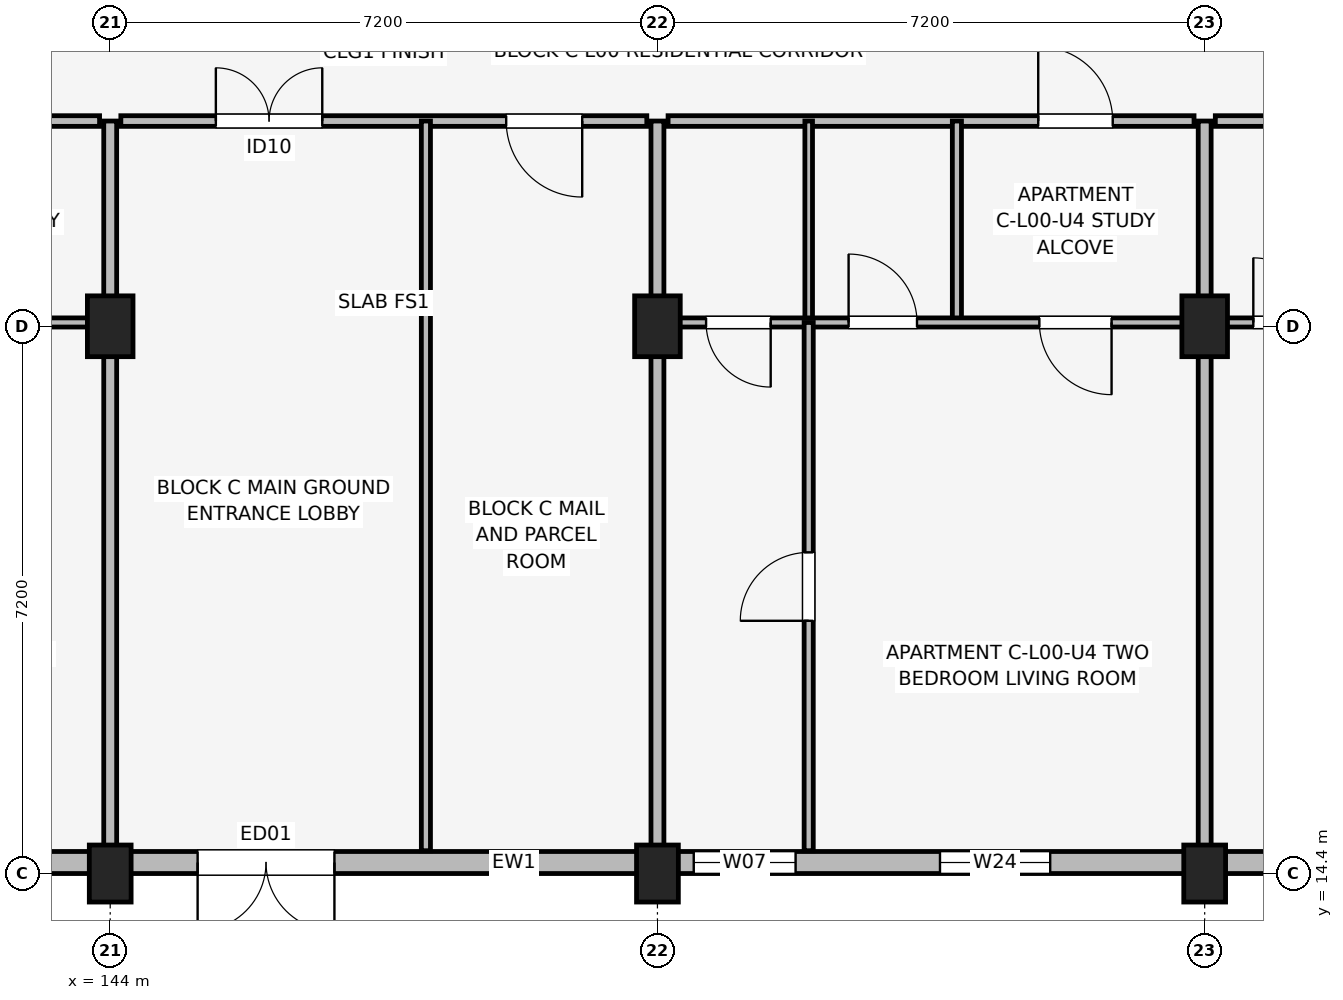
"""IFC4 building model, lengths in metres.
Left out: names, types, materials, properties, quantities, classifications, styles, units other than length and angle.
Written with IfcOpenShell. Run it as: python <this file> out.ifc"""

import sys

from ifc_helpers import new_model, si_unit, direction, frame, frame_2d, origin, origin_2d, place, context, subcontext, project, spatial, rectangle, extrude, element, fill, save


model = new_model("IFC4")
c1 = context("Model", 3, precision=1e-05, world=origin(), true_north=direction((0.0, 1.0)))
c2 = subcontext(c1, "Body", "Model", "MODEL_VIEW")
j1 = project(units=[si_unit("LENGTHUNIT", "METRE"), si_unit("PLANEANGLEUNIT", "RADIAN")], contexts=[c1])
p1 = place(None, origin())
s1 = spatial("IfcSite", under=j1, at=p1, CompositionType="ELEMENT")
p2 = place(p1, origin())
s2 = spatial("IfcBuilding", under=s1, at=p2, CompositionType="ELEMENT")
p3 = place(p2, origin())
s3 = spatial("IfcBuildingStorey", under=s2, at=p3, CompositionType="ELEMENT", Elevation=0.0)
p4 = place(p3, frame((144.0, 14.4, 0.0), z_axis=(0.0, 0.0, 1.0), x_axis=(1.0, 0.0, 0.0)))
e1 = element("IfcColumn", 1, at=p4, inside=s3, PredefinedType="COLUMN", context=c2, shape_type="SweptSolid", body=[
    extrude(rectangle(XDim=0.55, YDim=0.75, at=origin_2d()), origin(), (0.0, 0.0, 1.0), 4.5),
])
p5 = place(p3, frame((144.0, 21.6, 0.0), z_axis=(0.0, 0.0, 1.0), x_axis=(1.0, 0.0, 0.0)))
e2 = element("IfcColumn", 2, at=p5, inside=s3, PredefinedType="COLUMN", context=c2, shape_type="SweptSolid", body=[
    extrude(rectangle(XDim=0.6, YDim=0.8, at=origin_2d()), origin(), (0.0, 0.0, 1.0), 4.5),
])
p6 = place(p3, frame((151.2, 14.4, 0.0), z_axis=(0.0, 0.0, 1.0), x_axis=(1.0, 0.0, 0.0)))
e3 = element("IfcColumn", 3, at=p6, inside=s3, PredefinedType="COLUMN", context=c2, shape_type="SweptSolid", body=[
    extrude(rectangle(XDim=0.55, YDim=0.75, at=origin_2d()), origin(), (0.0, 0.0, 1.0), 4.5),
])
p7 = place(p3, frame((151.2, 21.6, 0.0), z_axis=(0.0, 0.0, 1.0), x_axis=(1.0, 0.0, 0.0)))
e4 = element("IfcColumn", 4, at=p7, inside=s3, PredefinedType="COLUMN", context=c2, shape_type="SweptSolid", body=[
    extrude(rectangle(XDim=0.6, YDim=0.8, at=origin_2d()), origin(), (0.0, 0.0, 1.0), 4.5),
])
p8 = place(p3, frame((158.4, 14.4, 0.0), z_axis=(0.0, 0.0, 1.0), x_axis=(1.0, 0.0, 0.0)))
e5 = element("IfcColumn", 5, at=p8, inside=s3, PredefinedType="COLUMN", context=c2, shape_type="SweptSolid", body=[
    extrude(rectangle(XDim=0.55, YDim=0.75, at=origin_2d()), origin(), (0.0, 0.0, 1.0), 4.5),
])
p9 = place(p3, frame((158.4, 21.6, 0.0), z_axis=(0.0, 0.0, 1.0), x_axis=(1.0, 0.0, 0.0)))
e6 = element("IfcColumn", 6, at=p9, inside=s3, PredefinedType="COLUMN", context=c2, shape_type="SweptSolid", body=[
    extrude(rectangle(XDim=0.6, YDim=0.8, at=origin_2d()), origin(), (0.0, 0.0, 1.0), 4.5),
])
p10 = place(p3, frame((132.6, 14.545, 0.0), z_axis=(0.0, 0.0, 1.0), x_axis=(1.0, 0.0, 0.0)))
e7 = element("IfcWall", 7, at=p10, inside=s3, PredefinedType="SOLIDWALL", context=c2, shape_type="SweptSolid", body=[
    extrude(rectangle(XDim=30.0, YDim=0.29, at=frame_2d((15.0, 0.0))), origin(), (0.0, 0.0, 1.0), 3.38),
])
p11 = place(p10, frame((14.35, 0.0, 0.0), z_axis=(0.0, 0.0, 1.0), x_axis=(-1.0, 0.0, 0.0)))
e8 = element("IfcOpeningElement", 8, at=p11, cuts=e7, PredefinedType="OPENING", context=c2, shape_type="SweptSolid", body=[
    extrude(rectangle(XDim=1.8, YDim=2.4, at=frame_2d((0.9, 1.2))), frame((0.0, 0.155, 0.0), z_axis=(0.0, -1.0, 0.0), x_axis=(1.0, 0.0, 0.0)), (0.0, 0.0, 1.0), 0.31),
])
p12 = place(p10, frame((2.663, 0.0, 0.75)))
e9 = element("IfcOpeningElement", 9, at=p12, cuts=e7, PredefinedType="OPENING", context=c2, shape_type="SweptSolid", body=[
    extrude(rectangle(XDim=0.98, YDim=1.45, at=frame_2d((0.49, 0.725))), frame((0.0, 0.155, 0.0), z_axis=(0.0, -1.0, 0.0), x_axis=(1.0, 0.0, 0.0)), (0.0, 0.0, 1.0), 0.31),
])
p13 = place(p10, frame((4.798, 0.0, 0.75)))
e10 = element("IfcOpeningElement", 10, at=p13, cuts=e7, PredefinedType="OPENING", context=c2, shape_type="SweptSolid", body=[
    extrude(rectangle(XDim=1.1, YDim=1.5, at=frame_2d((0.55, 0.75))), frame((0.0, 0.155, 0.0), z_axis=(0.0, -1.0, 0.0), x_axis=(1.0, 0.0, 0.0)), (0.0, 0.0, 1.0), 0.31),
])
p14 = place(p10, frame((7.492, 0.0, 0.7)))
e11 = element("IfcOpeningElement", 11, at=p14, cuts=e7, PredefinedType="OPENING", context=c2, shape_type="SweptSolid", body=[
    extrude(rectangle(XDim=2.3, YDim=1.65, at=frame_2d((1.15, 0.825))), frame((0.0, 0.155, 0.0), z_axis=(0.0, -1.0, 0.0), x_axis=(1.0, 0.0, 0.0)), (0.0, 0.0, 1.0), 0.31),
])
p15 = place(p10, frame((19.077, 0.0, 0.75)))
e12 = element("IfcOpeningElement", 12, at=p15, cuts=e7, PredefinedType="OPENING", context=c2, shape_type="SweptSolid", body=[
    extrude(rectangle(XDim=1.34, YDim=1.55, at=frame_2d((0.67, 0.775))), frame((0.0, 0.155, 0.0), z_axis=(0.0, -1.0, 0.0), x_axis=(1.0, 0.0, 0.0)), (0.0, 0.0, 1.0), 0.31),
])
p16 = place(p10, frame((22.317, 0.0, 0.7)))
e13 = element("IfcOpeningElement", 13, at=p16, cuts=e7, PredefinedType="OPENING", context=c2, shape_type="SweptSolid", body=[
    extrude(rectangle(XDim=1.45, YDim=2.1, at=frame_2d((0.725, 1.05))), frame((0.0, 0.155, 0.0), z_axis=(0.0, -1.0, 0.0), x_axis=(1.0, 0.0, 0.0)), (0.0, 0.0, 1.0), 0.31),
])
p17 = place(p10, frame((26.647, 0.0, 0.75)))
e14 = element("IfcOpeningElement", 14, at=p17, cuts=e7, PredefinedType="OPENING", context=c2, shape_type="SweptSolid", body=[
    extrude(rectangle(XDim=0.6, YDim=1.25, at=frame_2d((0.3, 0.625))), frame((0.0, 0.155, 0.0), z_axis=(0.0, -1.0, 0.0), x_axis=(1.0, 0.0, 0.0)), (0.0, 0.0, 1.0), 0.31),
])
p18 = place(p10, frame((28.455, 0.0, 0.75)))
e15 = element("IfcOpeningElement", 15, at=p18, cuts=e7, PredefinedType="OPENING", context=c2, shape_type="SweptSolid", body=[
    extrude(rectangle(XDim=0.72, YDim=1.35, at=frame_2d((0.36, 0.675))), frame((0.0, 0.155, 0.0), z_axis=(0.0, -1.0, 0.0), x_axis=(1.0, 0.0, 0.0)), (0.0, 0.0, 1.0), 0.31),
])
p19 = place(p3, frame((136.94, 24.3, 0.0), z_axis=(0.0, 0.0, 1.0), x_axis=(1.0, 0.0, 0.0)))
e16 = element("IfcWall", 16, at=p19, inside=s3, PredefinedType="PARTITIONING", context=c2, shape_type="SweptSolid", body=[
    extrude(rectangle(XDim=6.92, YDim=0.14, at=frame_2d((3.46, 0.0))), origin(), (0.0, 0.0, 1.0), 3.15),
])
p20 = place(p19, frame((4.87, 0.0, 0.0)))
e17 = element("IfcOpeningElement", 17, at=p20, cuts=e16, PredefinedType="OPENING", context=c2, shape_type="SweptSolid", body=[
    extrude(rectangle(XDim=0.98, YDim=2.1, at=frame_2d((0.49, 1.05))), frame((0.0, 0.08, 0.0), z_axis=(0.0, -1.0, 0.0), x_axis=(1.0, 0.0, 0.0)), (0.0, 0.0, 1.0), 0.16),
])
p21 = place(p3, frame((136.94, 21.65, 0.0), z_axis=(0.0, 0.0, 1.0), x_axis=(1.0, 0.0, 0.0)))
e18 = element("IfcWall", 18, at=p21, inside=s3, PredefinedType="PARTITIONING", context=c2, shape_type="SweptSolid", body=[
    extrude(rectangle(XDim=6.92, YDim=0.12, at=frame_2d((3.46, 0.0))), origin(), (0.0, 0.0, 1.0), 3.15),
])
p22 = place(p21, frame((1.35, 0.0, 0.0), z_axis=(0.0, 0.0, 1.0), x_axis=(-1.0, 0.0, 0.0)))
e19 = element("IfcOpeningElement", 19, at=p22, cuts=e18, PredefinedType="OPENING", context=c2, shape_type="SweptSolid", body=[
    extrude(rectangle(XDim=0.85, YDim=2.08, at=frame_2d((0.425, 1.04))), frame((0.0, 0.07, 0.0), z_axis=(0.0, -1.0, 0.0), x_axis=(1.0, 0.0, 0.0)), (0.0, 0.0, 1.0), 0.14),
])
p23 = place(p21, frame((2.375, 0.0, 0.0)))
e20 = element("IfcOpeningElement", 20, at=p23, cuts=e18, PredefinedType="OPENING", context=c2, shape_type="SweptSolid", body=[
    extrude(rectangle(XDim=0.9, YDim=2.08, at=frame_2d((0.45, 1.04))), frame((0.0, 0.07, 0.0), z_axis=(0.0, -1.0, 0.0), x_axis=(1.0, 0.0, 0.0)), (0.0, 0.0, 1.0), 0.14),
])
p24 = place(p21, frame((5.835, 0.0, 0.0), z_axis=(0.0, 0.0, 1.0), x_axis=(-1.0, 0.0, 0.0)))
e21 = element("IfcOpeningElement", 21, at=p24, cuts=e18, PredefinedType="OPENING", context=c2, shape_type="SweptSolid", body=[
    extrude(rectangle(XDim=0.95, YDim=2.08, at=frame_2d((0.475, 1.04))), frame((0.0, 0.07, 0.0), z_axis=(0.0, -1.0, 0.0), x_axis=(1.0, 0.0, 0.0)), (0.0, 0.0, 1.0), 0.14),
])
p25 = place(p3, frame((144.0, 14.7, 0.0), z_axis=(0.0, 0.0, 1.0), x_axis=(0.0, 1.0, 0.0)))
e22 = element("IfcWall", 22, at=p25, inside=s3, PredefinedType="PARTITIONING", context=c2, shape_type="SweptSolid", body=[
    extrude(rectangle(XDim=9.6, YDim=0.17, at=frame_2d((4.8, 0.0))), origin(), (0.0, 0.0, 1.0), 3.15),
])
p26 = place(p3, frame((144.14, 24.3, 0.0), z_axis=(0.0, 0.0, 1.0), x_axis=(1.0, 0.0, 0.0)))
e23 = element("IfcWall", 23, at=p26, inside=s3, PredefinedType="PARTITIONING", context=c2, shape_type="SweptSolid", body=[
    extrude(rectangle(XDim=6.92, YDim=0.14, at=frame_2d((3.46, 0.0))), origin(), (0.0, 0.0, 1.0), 3.15),
])
p27 = place(p26, frame((1.25, 0.0, 0.0)))
e24 = element("IfcOpeningElement", 24, at=p27, cuts=e23, PredefinedType="OPENING", context=c2, shape_type="SweptSolid", body=[
    extrude(rectangle(XDim=1.4, YDim=2.22, at=frame_2d((0.7, 1.11))), frame((0.0, 0.08, 0.0), z_axis=(0.0, -1.0, 0.0), x_axis=(1.0, 0.0, 0.0)), (0.0, 0.0, 1.0), 0.16),
])
p28 = place(p26, frame((6.07, 0.0, 0.0), z_axis=(0.0, 0.0, 1.0), x_axis=(-1.0, 0.0, 0.0)))
e25 = element("IfcOpeningElement", 25, at=p28, cuts=e23, PredefinedType="OPENING", context=c2, shape_type="SweptSolid", body=[
    extrude(rectangle(XDim=1.0, YDim=2.12, at=frame_2d((0.5, 1.06))), frame((0.0, 0.08, 0.0), z_axis=(0.0, -1.0, 0.0), x_axis=(1.0, 0.0, 0.0)), (0.0, 0.0, 1.0), 0.16),
])
p29 = place(p3, frame((148.154, 14.7, 0.0), z_axis=(0.0, 0.0, 1.0), x_axis=(0.0, 1.0, 0.0)))
e26 = element("IfcWall", 26, at=p29, inside=s3, PredefinedType="PARTITIONING", context=c2, shape_type="SweptSolid", body=[
    extrude(rectangle(XDim=9.6, YDim=0.12, at=frame_2d((4.8, 0.0))), origin(), (0.0, 0.0, 1.0), 3.15),
])
p30 = place(p3, frame((151.2, 14.7, 0.0), z_axis=(0.0, 0.0, 1.0), x_axis=(0.0, 1.0, 0.0)))
e27 = element("IfcWall", 27, at=p30, inside=s3, PredefinedType="PARTITIONING", context=c2, shape_type="SweptSolid", body=[
    extrude(rectangle(XDim=9.6, YDim=0.17, at=frame_2d((4.8, 0.0))), origin(), (0.0, 0.0, 1.0), 3.15),
])
p31 = place(p3, frame((151.34, 24.3, 0.0), z_axis=(0.0, 0.0, 1.0), x_axis=(1.0, 0.0, 0.0)))
e28 = element("IfcWall", 28, at=p31, inside=s3, PredefinedType="PARTITIONING", context=c2, shape_type="SweptSolid", body=[
    extrude(rectangle(XDim=6.92, YDim=0.14, at=frame_2d((3.46, 0.0))), origin(), (0.0, 0.0, 1.0), 3.15),
])
p32 = place(p31, frame((4.87, 0.0, 0.0)))
e29 = element("IfcOpeningElement", 29, at=p32, cuts=e28, PredefinedType="OPENING", context=c2, shape_type="SweptSolid", body=[
    extrude(rectangle(XDim=0.98, YDim=2.1, at=frame_2d((0.49, 1.05))), frame((0.0, 0.08, 0.0), z_axis=(0.0, -1.0, 0.0), x_axis=(1.0, 0.0, 0.0)), (0.0, 0.0, 1.0), 0.16),
])
p33 = place(p3, frame((153.19, 21.65, 0.0), z_axis=(0.0, 0.0, 1.0), x_axis=(0.0, 1.0, 0.0)))
e30 = element("IfcWall", 30, at=p33, inside=s3, PredefinedType="PARTITIONING", context=c2, shape_type="SweptSolid", body=[
    extrude(rectangle(XDim=2.65, YDim=0.1, at=frame_2d((1.325, 0.0))), origin(), (0.0, 0.0, 1.0), 3.15),
])
p34 = place(p3, frame((155.14, 21.65, 0.0), z_axis=(0.0, 0.0, 1.0), x_axis=(0.0, 1.0, 0.0)))
e31 = element("IfcWall", 31, at=p34, inside=s3, PredefinedType="PARTITIONING", context=c2, shape_type="SweptSolid", body=[
    extrude(rectangle(XDim=2.65, YDim=0.12, at=frame_2d((1.325, 0.0))), origin(), (0.0, 0.0, 1.0), 3.15),
])
p35 = place(p3, frame((151.34, 21.65, 0.0), z_axis=(0.0, 0.0, 1.0), x_axis=(1.0, 0.0, 0.0)))
e32 = element("IfcWall", 32, at=p35, inside=s3, PredefinedType="PARTITIONING", context=c2, shape_type="SweptSolid", body=[
    extrude(rectangle(XDim=6.92, YDim=0.12, at=frame_2d((3.46, 0.0))), origin(), (0.0, 0.0, 1.0), 3.15),
])
p36 = place(p35, frame((1.35, 0.0, 0.0), z_axis=(0.0, 0.0, 1.0), x_axis=(-1.0, 0.0, 0.0)))
e33 = element("IfcOpeningElement", 33, at=p36, cuts=e32, PredefinedType="OPENING", context=c2, shape_type="SweptSolid", body=[
    extrude(rectangle(XDim=0.85, YDim=2.08, at=frame_2d((0.425, 1.04))), frame((0.0, 0.07, 0.0), z_axis=(0.0, -1.0, 0.0), x_axis=(1.0, 0.0, 0.0)), (0.0, 0.0, 1.0), 0.14),
])
p37 = place(p35, frame((2.375, 0.0, 0.0)))
e34 = element("IfcOpeningElement", 34, at=p37, cuts=e32, PredefinedType="OPENING", context=c2, shape_type="SweptSolid", body=[
    extrude(rectangle(XDim=0.9, YDim=2.08, at=frame_2d((0.45, 1.04))), frame((0.0, 0.07, 0.0), z_axis=(0.0, -1.0, 0.0), x_axis=(1.0, 0.0, 0.0)), (0.0, 0.0, 1.0), 0.14),
])
p38 = place(p35, frame((5.835, 0.0, 0.0), z_axis=(0.0, 0.0, 1.0), x_axis=(-1.0, 0.0, 0.0)))
e35 = element("IfcOpeningElement", 35, at=p38, cuts=e32, PredefinedType="OPENING", context=c2, shape_type="SweptSolid", body=[
    extrude(rectangle(XDim=0.95, YDim=2.08, at=frame_2d((0.475, 1.04))), frame((0.0, 0.07, 0.0), z_axis=(0.0, -1.0, 0.0), x_axis=(1.0, 0.0, 0.0)), (0.0, 0.0, 1.0), 0.14),
])
p39 = place(p3, frame((153.19, 14.7, 0.0), z_axis=(0.0, 0.0, 1.0), x_axis=(0.0, 1.0, 0.0)))
e36 = element("IfcWall", 36, at=p39, inside=s3, PredefinedType="PARTITIONING", context=c2, shape_type="SweptSolid", body=[
    extrude(rectangle(XDim=6.95, YDim=0.12, at=frame_2d((3.475, 0.0))), origin(), (0.0, 0.0, 1.0), 3.15),
])
p40 = place(p39, frame((3.025, 0.0, 0.0)))
e37 = element("IfcOpeningElement", 37, at=p40, cuts=e36, PredefinedType="OPENING", context=c2, shape_type="SweptSolid", body=[
    extrude(rectangle(XDim=0.9, YDim=2.08, at=frame_2d((0.45, 1.04))), frame((0.0, 0.07, 0.0), z_axis=(0.0, -1.0, 0.0), x_axis=(1.0, 0.0, 0.0)), (0.0, 0.0, 1.0), 0.14),
])
p41 = place(p3, frame((158.4, 14.7, 0.0), z_axis=(0.0, 0.0, 1.0), x_axis=(0.0, 1.0, 0.0)))
e38 = element("IfcWall", 38, at=p41, inside=s3, PredefinedType="PARTITIONING", context=c2, shape_type="SweptSolid", body=[
    extrude(rectangle(XDim=9.6, YDim=0.17, at=frame_2d((4.8, 0.0))), origin(), (0.0, 0.0, 1.0), 3.15),
])
p42 = place(p3, frame((158.54, 24.3, 0.0), z_axis=(0.0, 0.0, 1.0), x_axis=(1.0, 0.0, 0.0)))
e39 = element("IfcWall", 39, at=p42, inside=s3, PredefinedType="PARTITIONING", context=c2, shape_type="SweptSolid", body=[
    extrude(rectangle(XDim=6.92, YDim=0.14, at=frame_2d((3.46, 0.0))), origin(), (0.0, 0.0, 1.0), 3.15),
])
p43 = place(p42, frame((4.875, 0.0, 0.0), z_axis=(0.0, 0.0, 1.0), x_axis=(-1.0, 0.0, 0.0)))
e40 = element("IfcOpeningElement", 40, at=p43, cuts=e39, PredefinedType="OPENING", context=c2, shape_type="SweptSolid", body=[
    extrude(rectangle(XDim=0.98, YDim=2.1, at=frame_2d((0.49, 1.05))), frame((0.0, 0.08, 0.0), z_axis=(0.0, -1.0, 0.0), x_axis=(1.0, 0.0, 0.0)), (0.0, 0.0, 1.0), 0.16),
])
p44 = place(p3, frame((158.54, 21.65, 0.0), z_axis=(0.0, 0.0, 1.0), x_axis=(1.0, 0.0, 0.0)))
e41 = element("IfcWall", 41, at=p44, inside=s3, PredefinedType="PARTITIONING", context=c2, shape_type="SweptSolid", body=[
    extrude(rectangle(XDim=6.92, YDim=0.12, at=frame_2d((3.46, 0.0))), origin(), (0.0, 0.0, 1.0), 3.15),
])
p45 = place(p44, frame((0.5, 0.0, 0.0)))
e42 = element("IfcOpeningElement", 42, at=p45, cuts=e41, PredefinedType="OPENING", context=c2, shape_type="SweptSolid", body=[
    extrude(rectangle(XDim=0.85, YDim=2.08, at=frame_2d((0.425, 1.04))), frame((0.0, 0.07, 0.0), z_axis=(0.0, -1.0, 0.0), x_axis=(1.0, 0.0, 0.0)), (0.0, 0.0, 1.0), 0.14),
])
p46 = place(p44, frame((3.155, 0.0, 0.0), z_axis=(0.0, 0.0, 1.0), x_axis=(-1.0, 0.0, 0.0)))
e43 = element("IfcOpeningElement", 43, at=p46, cuts=e41, PredefinedType="OPENING", context=c2, shape_type="SweptSolid", body=[
    extrude(rectangle(XDim=0.9, YDim=2.08, at=frame_2d((0.45, 1.04))), frame((0.0, 0.07, 0.0), z_axis=(0.0, -1.0, 0.0), x_axis=(1.0, 0.0, 0.0)), (0.0, 0.0, 1.0), 0.14),
])
p47 = place(p44, frame((3.91, 0.0, 0.0)))
e44 = element("IfcOpeningElement", 44, at=p47, cuts=e41, PredefinedType="OPENING", context=c2, shape_type="SweptSolid", body=[
    extrude(rectangle(XDim=0.95, YDim=2.08, at=frame_2d((0.475, 1.04))), frame((0.0, 0.07, 0.0), z_axis=(0.0, -1.0, 0.0), x_axis=(1.0, 0.0, 0.0)), (0.0, 0.0, 1.0), 0.14),
])
p48 = place(p11, origin())
e45 = element("IfcDoor", 45, at=p48, inside=s3, OperationType="DOUBLE_DOOR_SINGLE_SWING", PredefinedType="DOOR", context=c2, shape_type="SweptSolid", body=[
    extrude(rectangle(XDim=1.8, YDim=2.4, at=frame_2d((0.9, 1.2))), frame((0.0, 0.025, 0.0), z_axis=(0.0, -1.0, 0.0), x_axis=(1.0, 0.0, 0.0)), (0.0, 0.0, 1.0), 0.05),
])
fill(e8, e45)
p49 = place(p15, origin())
e46 = element("IfcWindow", 46, at=p49, inside=s3, PartitioningType="SINGLE_PANEL", PredefinedType="WINDOW", context=c2, shape_type="SweptSolid", body=[
    extrude(rectangle(XDim=1.34, YDim=1.55, at=frame_2d((0.67, 0.775))), frame((0.0, 0.03, 0.0), z_axis=(0.0, -1.0, 0.0), x_axis=(1.0, 0.0, 0.0)), (0.0, 0.0, 1.0), 0.06),
])
fill(e12, e46)
p50 = place(p16, origin())
e47 = element("IfcWindow", 47, at=p50, inside=s3, PartitioningType="SINGLE_PANEL", PredefinedType="WINDOW", context=c2, shape_type="SweptSolid", body=[
    extrude(rectangle(XDim=1.45, YDim=2.1, at=frame_2d((0.725, 1.05))), frame((0.0, 0.03, 0.0), z_axis=(0.0, -1.0, 0.0), x_axis=(1.0, 0.0, 0.0)), (0.0, 0.0, 1.0), 0.06),
])
fill(e13, e47)
p51 = place(p27, origin())
e48 = element("IfcDoor", 48, at=p51, inside=s3, OperationType="DOUBLE_DOOR_SINGLE_SWING", PredefinedType="DOOR", context=c2, shape_type="SweptSolid", body=[
    extrude(rectangle(XDim=1.4, YDim=2.22, at=frame_2d((0.7, 1.11))), frame((0.0, 0.025, 0.0), z_axis=(0.0, -1.0, 0.0), x_axis=(1.0, 0.0, 0.0)), (0.0, 0.0, 1.0), 0.05),
])
fill(e24, e48)
p52 = place(p28, origin())
e49 = element("IfcDoor", 49, at=p52, inside=s3, OperationType="SINGLE_SWING_RIGHT", PredefinedType="DOOR", context=c2, shape_type="SweptSolid", body=[
    extrude(rectangle(XDim=1.0, YDim=2.12, at=frame_2d((0.5, 1.06))), frame((0.0, 0.025, 0.0), z_axis=(0.0, -1.0, 0.0), x_axis=(1.0, 0.0, 0.0)), (0.0, 0.0, 1.0), 0.05),
])
fill(e25, e49)
p53 = place(p32, origin())
e50 = element("IfcDoor", 50, at=p53, inside=s3, OperationType="SINGLE_SWING_LEFT", PredefinedType="DOOR", context=c2, shape_type="SweptSolid", body=[
    extrude(rectangle(XDim=0.98, YDim=2.1, at=frame_2d((0.49, 1.05))), frame((0.0, 0.025, 0.0), z_axis=(0.0, -1.0, 0.0), x_axis=(1.0, 0.0, 0.0)), (0.0, 0.0, 1.0), 0.05),
])
fill(e29, e50)
p54 = place(p36, origin())
e51 = element("IfcDoor", 51, at=p54, inside=s3, OperationType="SINGLE_SWING_RIGHT", PredefinedType="DOOR", context=c2, shape_type="SweptSolid", body=[
    extrude(rectangle(XDim=0.85, YDim=2.08, at=frame_2d((0.425, 1.04))), frame((0.0, 0.025, 0.0), z_axis=(0.0, -1.0, 0.0), x_axis=(1.0, 0.0, 0.0)), (0.0, 0.0, 1.0), 0.05),
])
fill(e33, e51)
p55 = place(p37, origin())
e52 = element("IfcDoor", 52, at=p55, inside=s3, OperationType="SINGLE_SWING_LEFT", PredefinedType="DOOR", context=c2, shape_type="SweptSolid", body=[
    extrude(rectangle(XDim=0.9, YDim=2.08, at=frame_2d((0.45, 1.04))), frame((0.0, 0.025, 0.0), z_axis=(0.0, -1.0, 0.0), x_axis=(1.0, 0.0, 0.0)), (0.0, 0.0, 1.0), 0.05),
])
fill(e34, e52)
p56 = place(p38, origin())
e53 = element("IfcDoor", 53, at=p56, inside=s3, OperationType="SINGLE_SWING_RIGHT", PredefinedType="DOOR", context=c2, shape_type="SweptSolid", body=[
    extrude(rectangle(XDim=0.95, YDim=2.08, at=frame_2d((0.475, 1.04))), frame((0.0, 0.025, 0.0), z_axis=(0.0, -1.0, 0.0), x_axis=(1.0, 0.0, 0.0)), (0.0, 0.0, 1.0), 0.05),
])
fill(e35, e53)
p57 = place(p40, origin())
e54 = element("IfcDoor", 54, at=p57, inside=s3, OperationType="SINGLE_SWING_LEFT", PredefinedType="DOOR", context=c2, shape_type="SweptSolid", body=[
    extrude(rectangle(XDim=0.9, YDim=2.08, at=frame_2d((0.45, 1.04))), frame((0.0, 0.025, 0.0), z_axis=(0.0, -1.0, 0.0), x_axis=(1.0, 0.0, 0.0)), (0.0, 0.0, 1.0), 0.05),
])
fill(e37, e54)
p58 = place(p45, origin())
e55 = element("IfcDoor", 55, at=p58, inside=s3, OperationType="SINGLE_SWING_LEFT", PredefinedType="DOOR", context=c2, shape_type="SweptSolid", body=[
    extrude(rectangle(XDim=0.85, YDim=2.08, at=frame_2d((0.425, 1.04))), frame((0.0, 0.025, 0.0), z_axis=(0.0, -1.0, 0.0), x_axis=(1.0, 0.0, 0.0)), (0.0, 0.0, 1.0), 0.05),
])
fill(e42, e55)
save(model, sys.argv[1])
